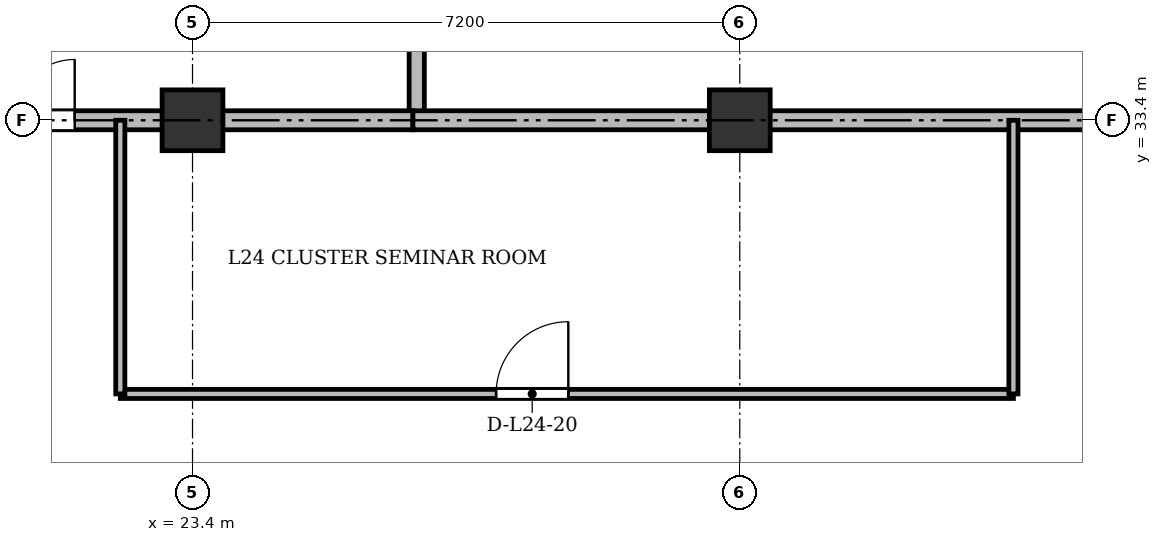
"""IFC4 building model, lengths in metres.
Left out: names, types, materials, properties, quantities, classifications, styles, units other than length and angle.
Written with IfcOpenShell. Run it as: python <this file> out.ifc"""

import sys

from ifc_helpers import new_model, si_unit, direction, frame, frame_2d, origin, origin_2d, place, context, subcontext, project, spatial, rectangle, extrude, source, transform, mapped, element, fill, save


model = new_model("IFC4")
c1 = context("Model", 3, precision=1e-05, world=origin(), true_north=direction((0.0, 1.0)))
c2 = subcontext(c1, "Body", "Model", "MODEL_VIEW")
j1 = project(units=[si_unit("LENGTHUNIT", "METRE"), si_unit("PLANEANGLEUNIT", "RADIAN")], contexts=[c1])
p1 = place(None, origin())
s1 = spatial("IfcSite", under=j1, at=p1, CompositionType="ELEMENT")
p2 = place(p1, origin())
s2 = spatial("IfcBuilding", under=s1, at=p2, CompositionType="ELEMENT")
p3 = place(p2, frame((0.0, 0.0, 96.1)))
s3 = spatial("IfcBuildingStorey", under=s2, at=p3, CompositionType="ELEMENT", Elevation=96.1)
m1 = source(origin(), c2, "Body", "SweptSolid", [
    extrude(rectangle(XDim=0.8, YDim=0.8, at=origin_2d()), origin(), (0.0, 0.0, 1.0), 3.6),
])
for number, where, z_axis, x_axis in (
    (1, (23.4, 33.4, 0.0), (0.0, 0.0, 1.0), (1.0, 0.0, 0.0)),
    (2, (30.6, 33.4, 0.0), (0.0, 0.0, 1.0), (1.0, 0.0, 0.0)),
):
    element("IfcColumn", number, at=place(p3, frame(where, z_axis=z_axis, x_axis=x_axis)), inside=s3, PredefinedType="COLUMN", context=c2, shape_type="MappedRepresentation", body=[
        mapped(m1, transform((0.0, 0.0, 0.0), x_axis=(1.0, 0.0, 0.0), y_axis=(0.0, 1.0, 0.0), z_axis=(0.0, 0.0, 1.0), scale=1.0)),
    ])
p4 = place(p3, frame((26.35, 33.4, 0.0), z_axis=(0.0, 0.0, 1.0), x_axis=(0.0, 1.0, 0.0)))
e3 = element("IfcWall", 3, at=p4, inside=s3, PredefinedType="SOLIDWALL", context=c2, shape_type="SweptSolid", body=[
    extrude(rectangle(XDim=11.3, YDim=0.2, at=frame_2d((5.65, 0.0))), origin(), (0.0, 0.0, 1.0), 2.752),
])
p5 = place(p3, frame((19.5, 33.4, 0.0), z_axis=(0.0, 0.0, 1.0), x_axis=(1.0, 0.0, 0.0)))
e4 = element("IfcWall", 4, at=p5, inside=s3, PredefinedType="PARTITIONING", context=c2, shape_type="SweptSolid", body=[
    extrude(rectangle(XDim=6.8, YDim=0.25, at=frame_2d((3.4, 0.0))), origin(), (0.0, 0.0, 1.0), 2.752),
])
p6 = place(p5, frame((0.75, 0.0, 0.0)))
e5 = element("IfcOpeningElement", 5, at=p6, cuts=e4, PredefinedType="OPENING", context=c2, shape_type="SweptSolid", body=[
    extrude(rectangle(XDim=1.6, YDim=2.2, at=frame_2d((0.8, 1.1))), frame((0.0, 0.135, 0.0), z_axis=(0.0, -1.0, 0.0), x_axis=(1.0, 0.0, 0.0)), (0.0, 0.0, 1.0), 0.27),
])
p7 = place(p3, frame((26.3, 33.4, 0.0), z_axis=(0.0, 0.0, 1.0), x_axis=(1.0, 0.0, 0.0)))
e6 = element("IfcWall", 6, at=p7, inside=s3, PredefinedType="PARTITIONING", context=c2, shape_type="SweptSolid", body=[
    extrude(rectangle(XDim=20.85, YDim=0.25, at=frame_2d((10.425, 0.0))), origin(), (0.0, 0.0, 1.0), 2.752),
])
p8 = place(p7, frame((9.2, 0.0, 0.0)))
e7 = element("IfcOpeningElement", 7, at=p8, cuts=e6, PredefinedType="OPENING", context=c2, shape_type="SweptSolid", body=[
    extrude(rectangle(XDim=1.6, YDim=2.2, at=frame_2d((0.8, 1.1))), frame((0.0, 0.135, 0.0), z_axis=(0.0, -1.0, 0.0), x_axis=(1.0, 0.0, 0.0)), (0.0, 0.0, 1.0), 0.27),
])
p9 = place(p3, frame((22.45, 29.8, 0.0), z_axis=(0.0, 0.0, 1.0), x_axis=(1.0, 0.0, 0.0)))
e8 = element("IfcWall", 8, at=p9, inside=s3, PredefinedType="PARTITIONING", context=c2, shape_type="SweptSolid", body=[
    extrude(rectangle(XDim=11.75, YDim=0.12, at=frame_2d((5.875, 0.0))), origin(), (0.0, 0.0, 1.0), 2.84),
])
p10 = place(p9, frame((4.944, 0.0, 0.0)))
e9 = element("IfcOpeningElement", 9, at=p10, cuts=e8, PredefinedType="OPENING", context=c2, shape_type="SweptSolid", body=[
    extrude(rectangle(XDim=0.95, YDim=2.15, at=frame_2d((0.475, 1.075))), frame((0.0, 0.07, 0.0), z_axis=(0.0, -1.0, 0.0), x_axis=(1.0, 0.0, 0.0)), (0.0, 0.0, 1.0), 0.14),
])
for number, where, z_axis, x_axis in (
    (10, (22.45, 29.8, 0.0), (0.0, 0.0, 1.0), (0.0, 1.0, 0.0)),
    (11, (34.2, 29.8, 0.0), (0.0, 0.0, 1.0), (0.0, 1.0, 0.0)),
):
    element("IfcWall", number, at=place(p3, frame(where, z_axis=z_axis, x_axis=x_axis)), inside=s3, PredefinedType="PARTITIONING", context=c2, shape_type="SweptSolid", body=[
        extrude(rectangle(XDim=3.6, YDim=0.12, at=frame_2d((1.8, 0.0))), origin(), (0.0, 0.0, 1.0), 2.752),
    ])
m2 = source(origin(), c2, "Body", "SweptSolid", [
    extrude(rectangle(XDim=1.6, YDim=2.2, at=frame_2d((0.8, 1.1))), frame((0.0, 0.025, 0.0), z_axis=(0.0, -1.0, 0.0), x_axis=(1.0, 0.0, 0.0)), (0.0, 0.0, 1.0), 0.05),
])
p11 = place(p6, origin())
e12 = element("IfcDoor", 12, at=p11, inside=s3, OperationType="DOUBLE_DOOR_SINGLE_SWING", PredefinedType="DOOR", context=c2, shape_type="MappedRepresentation", body=[
    mapped(m2, transform((0.0, 0.0, 0.0), x_axis=(1.0, 0.0, 0.0), y_axis=(0.0, 1.0, 0.0), z_axis=(0.0, 0.0, 1.0), scale=1.0)),
])
fill(e5, e12)
m3 = source(origin(), c2, "Body", "SweptSolid", [
    extrude(rectangle(XDim=0.95, YDim=2.15, at=frame_2d((0.475, 1.075))), frame((0.0, 0.025, 0.0), z_axis=(0.0, -1.0, 0.0), x_axis=(1.0, 0.0, 0.0)), (0.0, 0.0, 1.0), 0.05),
])
p12 = place(p10, origin())
e13 = element("IfcDoor", 13, at=p12, inside=s3, OperationType="SINGLE_SWING_RIGHT", PredefinedType="DOOR", context=c2, shape_type="MappedRepresentation", body=[
    mapped(m3, transform((0.0, 0.0, 0.0), x_axis=(1.0, 0.0, 0.0), y_axis=(0.0, 1.0, 0.0), z_axis=(0.0, 0.0, 1.0), scale=1.0)),
])
fill(e9, e13)
save(model, sys.argv[1])
